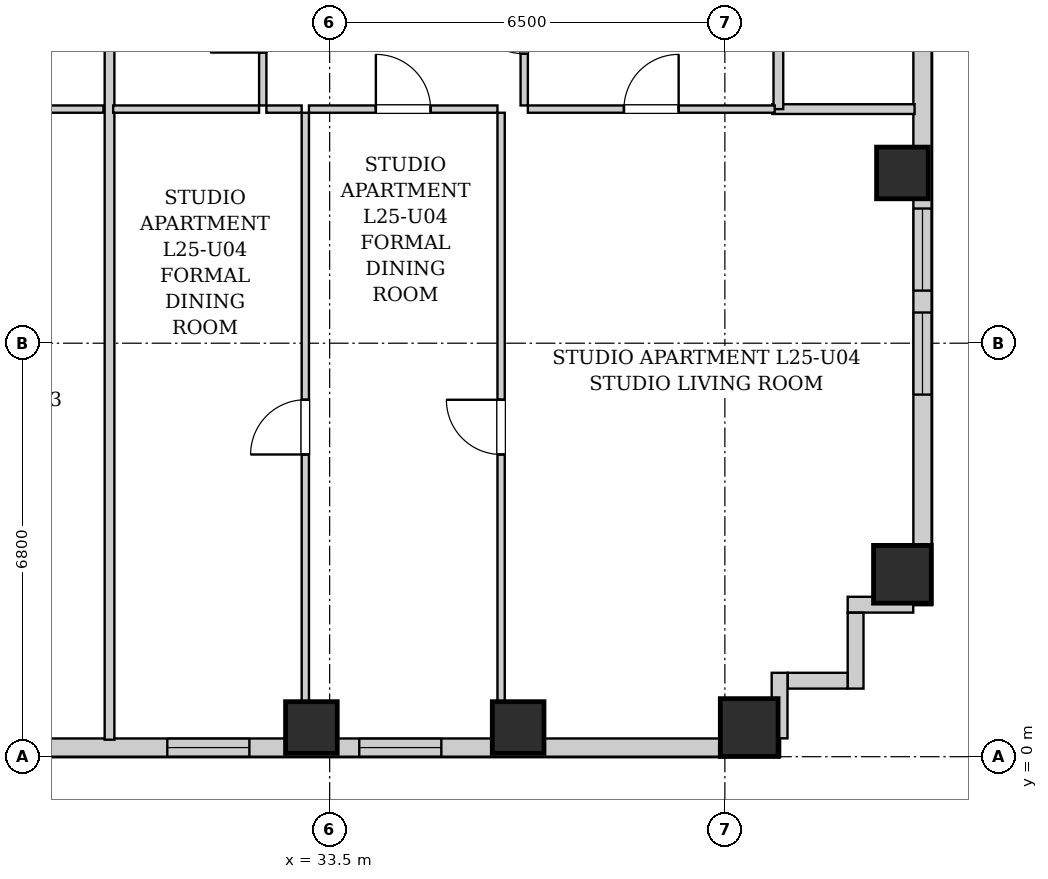
"""IFC4 building model, lengths in metres.
Left out: names, types, materials, properties, quantities, classifications, styles, units other than length and angle.
Written with IfcOpenShell. Run it as: python <this file> out.ifc"""

import sys

from ifc_helpers import new_model, si_unit, direction, frame, frame_2d, origin, origin_2d, place, context, subcontext, project, spatial, rectangle, extrude, element, fill, save


model = new_model("IFC4")
c1 = context("Model", 3, precision=1e-05, world=origin(), true_north=direction((0.0, 1.0)))
c2 = subcontext(c1, "Body", "Model", "MODEL_VIEW")
j1 = project(units=[si_unit("LENGTHUNIT", "METRE"), si_unit("PLANEANGLEUNIT", "RADIAN")], contexts=[c1])
p1 = place(None, origin())
s1 = spatial("IfcSite", under=j1, at=p1, CompositionType="ELEMENT")
p2 = place(p1, origin())
s2 = spatial("IfcBuilding", under=s1, at=p2, CompositionType="ELEMENT")
p3 = place(p2, frame((0.0, 0.0, 91.1)))
s3 = spatial("IfcBuildingStorey", under=s2, at=p3, CompositionType="ELEMENT", Elevation=91.1)
for number, where, z_axis, x_axis in (
    (1, (33.2, 0.48, 0.0), (0.0, 0.0, 1.0), (1.0, 0.0, 0.0)),
    (2, (36.6, 0.48, 0.0), (0.0, 0.0, 1.0), (1.0, 0.0, 0.0)),
):
    element("IfcColumn", number, at=place(p3, frame(where, z_axis=z_axis, x_axis=x_axis)), inside=s3, PredefinedType="COLUMN", context=c2, shape_type="SweptSolid", body=[
        extrude(rectangle(XDim=0.85, YDim=0.85, at=origin_2d()), origin(), (0.0, 0.0, 1.0), 3.2),
    ])
for number, where, z_axis, x_axis in (
    (3, (40.4, 0.48, 0.0), (0.0, 0.0, 1.0), (1.0, 0.0, 0.0)),
    (4, (42.92, 3.0, 0.0), (0.0, 0.0, 1.0), (1.0, 0.0, 0.0)),
):
    element("IfcColumn", number, at=place(p3, frame(where, z_axis=z_axis, x_axis=x_axis)), inside=s3, PredefinedType="COLUMN", context=c2, shape_type="SweptSolid", body=[
        extrude(rectangle(XDim=0.95, YDim=0.95, at=origin_2d()), origin(), (0.0, 0.0, 1.0), 3.2),
    ])
p4 = place(p3, frame((42.92, 9.6, 0.0), z_axis=(0.0, 0.0, 1.0), x_axis=(1.0, 0.0, 0.0)))
e5 = element("IfcColumn", 5, at=p4, inside=s3, PredefinedType="COLUMN", context=c2, shape_type="SweptSolid", body=[
    extrude(rectangle(XDim=0.85, YDim=0.85, at=origin_2d()), origin(), (0.0, 0.0, 1.0), 3.2),
])
p5 = place(p3, frame((43.25, 40.8, 0.0), z_axis=(0.0, 0.0, 1.0), x_axis=(0.0, -1.0, 0.0)))
e6 = element("IfcWall", 6, at=p5, inside=s3, PredefinedType="SOLIDWALL", context=c2, shape_type="SweptSolid", body=[
    extrude(rectangle(XDim=38.3, YDim=0.3, at=frame_2d((19.15, 0.0))), origin(), (0.0, 0.0, 1.0), 2.94),
])
p6 = place(p5, frame((33.495, 0.0, 0.55)))
e7 = element("IfcOpeningElement", 7, at=p6, cuts=e6, PredefinedType="OPENING", context=c2, shape_type="SweptSolid", body=[
    extrude(rectangle(XDim=1.35, YDim=1.2, at=frame_2d((0.675, 0.6))), frame((0.0, 0.16, 0.0), z_axis=(0.0, -1.0, 0.0), x_axis=(1.0, 0.0, 0.0)), (0.0, 0.0, 1.0), 0.32),
])
p7 = place(p5, frame((31.785, 0.0, 0.55)))
e8 = element("IfcOpeningElement", 8, at=p7, cuts=e6, PredefinedType="OPENING", context=c2, shape_type="SweptSolid", body=[
    extrude(rectangle(XDim=1.35, YDim=1.2, at=frame_2d((0.675, 0.6))), frame((0.0, 0.16, 0.0), z_axis=(0.0, -1.0, 0.0), x_axis=(1.0, 0.0, 0.0)), (0.0, 0.0, 1.0), 0.32),
])
p8 = place(p5, frame((3.08, 0.0, 0.55)))
e9 = element("IfcOpeningElement", 9, at=p8, cuts=e6, PredefinedType="OPENING", context=c2, shape_type="SweptSolid", body=[
    extrude(rectangle(XDim=1.35, YDim=1.2, at=frame_2d((0.675, 0.6))), frame((0.0, 0.16, 0.0), z_axis=(0.0, -1.0, 0.0), x_axis=(1.0, 0.0, 0.0)), (0.0, 0.0, 1.0), 0.32),
])
p9 = place(p5, frame((1.135, 0.0, 0.55)))
e10 = element("IfcOpeningElement", 10, at=p9, cuts=e6, PredefinedType="OPENING", context=c2, shape_type="SweptSolid", body=[
    extrude(rectangle(XDim=1.35, YDim=1.2, at=frame_2d((0.675, 0.6))), frame((0.0, 0.16, 0.0), z_axis=(0.0, -1.0, 0.0), x_axis=(1.0, 0.0, 0.0)), (0.0, 0.0, 1.0), 0.32),
])
p10 = place(p5, frame((21.93, 0.0, 0.55)))
e11 = element("IfcOpeningElement", 11, at=p10, cuts=e6, PredefinedType="OPENING", context=c2, shape_type="SweptSolid", body=[
    extrude(rectangle(XDim=1.35, YDim=1.2, at=frame_2d((0.675, 0.6))), frame((0.0, 0.16, 0.0), z_axis=(0.0, -1.0, 0.0), x_axis=(1.0, 0.0, 0.0)), (0.0, 0.0, 1.0), 0.32),
])
p11 = place(p5, frame((23.54, 0.0, 0.55)))
e12 = element("IfcOpeningElement", 12, at=p11, cuts=e6, PredefinedType="OPENING", context=c2, shape_type="SweptSolid", body=[
    extrude(rectangle(XDim=1.35, YDim=1.2, at=frame_2d((0.675, 0.6))), frame((0.0, 0.16, 0.0), z_axis=(0.0, -1.0, 0.0), x_axis=(1.0, 0.0, 0.0)), (0.0, 0.0, 1.0), 0.32),
])
p12 = place(p5, frame((14.95, 0.0, 0.55)))
e13 = element("IfcOpeningElement", 13, at=p12, cuts=e6, PredefinedType="OPENING", context=c2, shape_type="SweptSolid", body=[
    extrude(rectangle(XDim=1.35, YDim=1.2, at=frame_2d((0.675, 0.6))), frame((0.0, 0.16, 0.0), z_axis=(0.0, -1.0, 0.0), x_axis=(1.0, 0.0, 0.0)), (0.0, 0.0, 1.0), 0.32),
])
p13 = place(p5, frame((12.385, 0.0, 0.55)))
e14 = element("IfcOpeningElement", 14, at=p13, cuts=e6, PredefinedType="OPENING", context=c2, shape_type="SweptSolid", body=[
    extrude(rectangle(XDim=1.35, YDim=1.2, at=frame_2d((0.675, 0.6))), frame((0.0, 0.16, 0.0), z_axis=(0.0, -1.0, 0.0), x_axis=(1.0, 0.0, 0.0)), (0.0, 0.0, 1.0), 0.32),
])
p14 = place(p3, frame((40.9, 0.15, 0.0), z_axis=(0.0, 0.0, 1.0), x_axis=(-1.0, 0.0, 0.0)))
e15 = element("IfcWall", 15, at=p14, inside=s3, PredefinedType="SOLIDWALL", context=c2, shape_type="SweptSolid", body=[
    extrude(rectangle(XDim=23.9, YDim=0.3, at=frame_2d((11.95, 0.0))), origin(), (0.0, 0.0, 1.0), 2.94),
])
p15 = place(p14, frame((21.045, 0.0, 0.55)))
e16 = element("IfcOpeningElement", 16, at=p15, cuts=e15, PredefinedType="OPENING", context=c2, shape_type="SweptSolid", body=[
    extrude(rectangle(XDim=1.35, YDim=1.2, at=frame_2d((0.675, 0.6))), frame((0.0, 0.16, 0.0), z_axis=(0.0, -1.0, 0.0), x_axis=(1.0, 0.0, 0.0)), (0.0, 0.0, 1.0), 0.32),
])
p16 = place(p14, frame((18.4, 0.0, 0.55)))
e17 = element("IfcOpeningElement", 17, at=p16, cuts=e15, PredefinedType="OPENING", context=c2, shape_type="SweptSolid", body=[
    extrude(rectangle(XDim=1.35, YDim=1.2, at=frame_2d((0.675, 0.6))), frame((0.0, 0.16, 0.0), z_axis=(0.0, -1.0, 0.0), x_axis=(1.0, 0.0, 0.0)), (0.0, 0.0, 1.0), 0.32),
])
p17 = place(p14, frame((12.05, 0.0, 0.55)))
e18 = element("IfcOpeningElement", 18, at=p17, cuts=e15, PredefinedType="OPENING", context=c2, shape_type="SweptSolid", body=[
    extrude(rectangle(XDim=1.35, YDim=1.2, at=frame_2d((0.675, 0.6))), frame((0.0, 0.16, 0.0), z_axis=(0.0, -1.0, 0.0), x_axis=(1.0, 0.0, 0.0)), (0.0, 0.0, 1.0), 0.32),
])
p18 = place(p14, frame((8.72, 0.0, 0.55)))
e19 = element("IfcOpeningElement", 19, at=p18, cuts=e15, PredefinedType="OPENING", context=c2, shape_type="SweptSolid", body=[
    extrude(rectangle(XDim=1.35, YDim=1.2, at=frame_2d((0.675, 0.6))), frame((0.0, 0.16, 0.0), z_axis=(0.0, -1.0, 0.0), x_axis=(1.0, 0.0, 0.0)), (0.0, 0.0, 1.0), 0.32),
])
p19 = place(p14, frame((5.563, 0.0, 0.55)))
e20 = element("IfcOpeningElement", 20, at=p19, cuts=e15, PredefinedType="OPENING", context=c2, shape_type="SweptSolid", body=[
    extrude(rectangle(XDim=1.35, YDim=1.2, at=frame_2d((0.675, 0.6))), frame((0.0, 0.16, 0.0), z_axis=(0.0, -1.0, 0.0), x_axis=(1.0, 0.0, 0.0)), (0.0, 0.0, 1.0), 0.32),
])
p20 = place(p3, frame((43.098, 2.5, 0.0), z_axis=(0.0, 0.0, 1.0), x_axis=(-1.0, 0.0, 0.0)))
e21 = element("IfcWall", 21, at=p20, inside=s3, PredefinedType="SOLIDWALL", context=c2, shape_type="SweptSolid", body=[
    extrude(rectangle(XDim=1.078, YDim=0.26, at=frame_2d((0.539, 0.0))), origin(), (0.0, 0.0, 1.0), 2.94),
])
p21 = place(p3, frame((42.15, 2.368, 0.0), z_axis=(0.0, 0.0, 1.0), x_axis=(0.0, -1.0, 0.0)))
e22 = element("IfcWall", 22, at=p21, inside=s3, PredefinedType="SOLIDWALL", context=c2, shape_type="SweptSolid", body=[
    extrude(rectangle(XDim=1.248, YDim=0.26, at=frame_2d((0.624, 0.0))), origin(), (0.0, 0.0, 1.0), 2.94),
])
p22 = place(p3, frame((42.018, 1.25, 0.0), z_axis=(0.0, 0.0, 1.0), x_axis=(-1.0, 0.0, 0.0)))
e23 = element("IfcWall", 23, at=p22, inside=s3, PredefinedType="SOLIDWALL", context=c2, shape_type="SweptSolid", body=[
    extrude(rectangle(XDim=0.986, YDim=0.26, at=frame_2d((0.493, 0.0))), origin(), (0.0, 0.0, 1.0), 2.94),
])
p23 = place(p3, frame((40.9, 1.38, 0.0), z_axis=(0.0, 0.0, 1.0), x_axis=(0.0, -1.0, 0.0)))
e24 = element("IfcWall", 24, at=p23, inside=s3, PredefinedType="SOLIDWALL", context=c2, shape_type="SweptSolid", body=[
    extrude(rectangle(XDim=1.078, YDim=0.26, at=frame_2d((0.539, 0.0))), origin(), (0.0, 0.0, 1.0), 2.94),
])
p24 = place(p3, frame((25.382, 10.65, 0.0), z_axis=(0.0, 0.0, 1.0), x_axis=(1.0, 0.0, 0.0)))
e25 = element("IfcWall", 25, at=p24, inside=s3, PredefinedType="PARTITIONING", context=c2, shape_type="SweptSolid", body=[
    extrude(rectangle(XDim=4.398, YDim=0.12, at=frame_2d((2.199, 0.0))), origin(), (0.0, 0.0, 1.0), 2.94),
])
p25 = place(p24, frame((1.749, 0.0, 0.0)))
e26 = element("IfcOpeningElement", 26, at=p25, cuts=e25, PredefinedType="OPENING", context=c2, shape_type="SweptSolid", body=[
    extrude(rectangle(XDim=0.9, YDim=2.05, at=frame_2d((0.45, 1.025))), frame((0.0, 0.07, 0.0), z_axis=(0.0, -1.0, 0.0), x_axis=(1.0, 0.0, 0.0)), (0.0, 0.0, 1.0), 0.14),
])
p26 = place(p3, frame((40.78, 10.65, 0.0), z_axis=(0.0, 0.0, 1.0), x_axis=(1.0, 0.0, 0.0)))
e27 = element("IfcWall", 27, at=p26, inside=s3, PredefinedType="PARTITIONING", context=c2, shape_type="SweptSolid", body=[
    extrude(rectangle(XDim=2.34, YDim=0.16, at=frame_2d((1.17, 0.0))), origin(), (0.0, 0.0, 1.0), 2.94),
])
p27 = place(p3, frame((40.88, 10.65, 0.0), z_axis=(0.0, 0.0, 1.0), x_axis=(0.0, 1.0, 0.0)))
e28 = element("IfcWall", 28, at=p27, inside=s3, PredefinedType="PARTITIONING", context=c2, shape_type="SweptSolid", body=[
    extrude(rectangle(XDim=2.66, YDim=0.16, at=frame_2d((1.33, 0.0))), origin(), (0.0, 0.0, 1.0), 2.94),
])
p28 = place(p3, frame((29.88, 0.28, 0.0), z_axis=(0.0, 0.0, 1.0), x_axis=(0.0, 1.0, 0.0)))
e29 = element("IfcWall", 29, at=p28, inside=s3, PredefinedType="PARTITIONING", context=c2, shape_type="SweptSolid", body=[
    extrude(rectangle(XDim=13.03, YDim=0.16, at=frame_2d((6.515, 0.0))), origin(), (0.0, 0.0, 1.0), 2.94),
])
p29 = place(p3, frame((32.4, 10.71, 0.0), z_axis=(0.0, 0.0, 1.0), x_axis=(0.0, 1.0, 0.0)))
e30 = element("IfcWall", 30, at=p29, inside=s3, PredefinedType="PARTITIONING", context=c2, shape_type="SweptSolid", body=[
    extrude(rectangle(XDim=2.6, YDim=0.12, at=frame_2d((1.3, 0.0))), origin(), (0.0, 0.0, 1.0), 2.94),
])
p30 = place(p29, frame((0.87, 0.0, 0.0)))
e31 = element("IfcOpeningElement", 31, at=p30, cuts=e30, PredefinedType="OPENING", context=c2, shape_type="SweptSolid", body=[
    extrude(rectangle(XDim=0.86, YDim=2.05, at=frame_2d((0.43, 1.025))), frame((0.0, 0.07, 0.0), z_axis=(0.0, -1.0, 0.0), x_axis=(1.0, 0.0, 0.0)), (0.0, 0.0, 1.0), 0.14),
])
p31 = place(p3, frame((29.94, 10.65, 0.0), z_axis=(0.0, 0.0, 1.0), x_axis=(1.0, 0.0, 0.0)))
e32 = element("IfcWall", 32, at=p31, inside=s3, PredefinedType="PARTITIONING", context=c2, shape_type="SweptSolid", body=[
    extrude(rectangle(XDim=2.4, YDim=0.12, at=frame_2d((1.2, 0.0))), origin(), (0.0, 0.0, 1.0), 2.94),
])
p32 = place(p3, frame((36.7, 10.71, 0.0), z_axis=(0.0, 0.0, 1.0), x_axis=(0.0, 1.0, 0.0)))
e33 = element("IfcWall", 33, at=p32, inside=s3, PredefinedType="PARTITIONING", context=c2, shape_type="SweptSolid", body=[
    extrude(rectangle(XDim=2.6, YDim=0.12, at=frame_2d((1.3, 0.0))), origin(), (0.0, 0.0, 1.0), 2.94),
])
p33 = place(p32, frame((0.85, 0.0, 0.0)))
e34 = element("IfcOpeningElement", 34, at=p33, cuts=e33, PredefinedType="OPENING", context=c2, shape_type="SweptSolid", body=[
    extrude(rectangle(XDim=0.9, YDim=2.05, at=frame_2d((0.45, 1.025))), frame((0.0, 0.07, 0.0), z_axis=(0.0, -1.0, 0.0), x_axis=(1.0, 0.0, 0.0)), (0.0, 0.0, 1.0), 0.14),
])
p34 = place(p3, frame((32.46, 10.65, 0.0), z_axis=(0.0, 0.0, 1.0), x_axis=(1.0, 0.0, 0.0)))
e35 = element("IfcWall", 35, at=p34, inside=s3, PredefinedType="PARTITIONING", context=c2, shape_type="SweptSolid", body=[
    extrude(rectangle(XDim=0.58, YDim=0.12, at=frame_2d((0.29, 0.0))), origin(), (0.0, 0.0, 1.0), 2.94),
])
p35 = place(p3, frame((33.16, 10.65, 0.0), z_axis=(0.0, 0.0, 1.0), x_axis=(1.0, 0.0, 0.0)))
e36 = element("IfcWall", 36, at=p35, inside=s3, PredefinedType="PARTITIONING", context=c2, shape_type="SweptSolid", body=[
    extrude(rectangle(XDim=3.1, YDim=0.12, at=frame_2d((1.55, 0.0))), origin(), (0.0, 0.0, 1.0), 2.94),
])
p36 = place(p35, frame((1.1, 0.0, 0.0)))
e37 = element("IfcOpeningElement", 37, at=p36, cuts=e36, PredefinedType="OPENING", context=c2, shape_type="SweptSolid", body=[
    extrude(rectangle(XDim=0.9, YDim=2.05, at=frame_2d((0.45, 1.025))), frame((0.0, 0.07, 0.0), z_axis=(0.0, -1.0, 0.0), x_axis=(1.0, 0.0, 0.0)), (0.0, 0.0, 1.0), 0.14),
])
p37 = place(p3, frame((36.76, 10.65, 0.0), z_axis=(0.0, 0.0, 1.0), x_axis=(1.0, 0.0, 0.0)))
e38 = element("IfcWall", 38, at=p37, inside=s3, PredefinedType="PARTITIONING", context=c2, shape_type="SweptSolid", body=[
    extrude(rectangle(XDim=4.06, YDim=0.12, at=frame_2d((2.03, 0.0))), origin(), (0.0, 0.0, 1.0), 2.94),
])
p38 = place(p37, frame((1.58, 0.0, 0.0)))
e39 = element("IfcOpeningElement", 39, at=p38, cuts=e38, PredefinedType="OPENING", context=c2, shape_type="SweptSolid", body=[
    extrude(rectangle(XDim=0.9, YDim=2.05, at=frame_2d((0.45, 1.025))), frame((0.0, 0.07, 0.0), z_axis=(0.0, -1.0, 0.0), x_axis=(1.0, 0.0, 0.0)), (0.0, 0.0, 1.0), 0.14),
])
p39 = place(p3, frame((33.1, 0.28, 0.0), z_axis=(0.0, 0.0, 1.0), x_axis=(0.0, 1.0, 0.0)))
e40 = element("IfcWall", 40, at=p39, inside=s3, PredefinedType="PARTITIONING", context=c2, shape_type="SweptSolid", body=[
    extrude(rectangle(XDim=10.31, YDim=0.12, at=frame_2d((5.155, 0.0))), origin(), (0.0, 0.0, 1.0), 2.309),
])
p40 = place(p39, frame((4.69, 0.0, 0.0)))
e41 = element("IfcOpeningElement", 41, at=p40, cuts=e40, PredefinedType="OPENING", context=c2, shape_type="SweptSolid", body=[
    extrude(rectangle(XDim=0.9, YDim=2.05, at=frame_2d((0.45, 1.025))), frame((0.0, 0.07, 0.0), z_axis=(0.0, -1.0, 0.0), x_axis=(1.0, 0.0, 0.0)), (0.0, 0.0, 1.0), 0.14),
])
p41 = place(p3, frame((36.32, 0.28, 0.0), z_axis=(0.0, 0.0, 1.0), x_axis=(0.0, 1.0, 0.0)))
e42 = element("IfcWall", 42, at=p41, inside=s3, PredefinedType="PARTITIONING", context=c2, shape_type="SweptSolid", body=[
    extrude(rectangle(XDim=10.31, YDim=0.12, at=frame_2d((5.155, 0.0))), origin(), (0.0, 0.0, 1.0), 2.94),
])
p42 = place(p41, frame((4.69, 0.0, 0.0)))
e43 = element("IfcOpeningElement", 43, at=p42, cuts=e42, PredefinedType="OPENING", context=c2, shape_type="SweptSolid", body=[
    extrude(rectangle(XDim=0.9, YDim=2.05, at=frame_2d((0.45, 1.025))), frame((0.0, 0.07, 0.0), z_axis=(0.0, -1.0, 0.0), x_axis=(1.0, 0.0, 0.0)), (0.0, 0.0, 1.0), 0.14),
])
p43 = place(p30, origin())
e44 = element("IfcDoor", 44, at=p43, inside=s3, OperationType="SINGLE_SWING_LEFT", PredefinedType="DOOR", context=c2, shape_type="SweptSolid", body=[
    extrude(rectangle(XDim=0.86, YDim=2.05, at=frame_2d((0.43, 1.025))), frame((0.0, 0.025, 0.0), z_axis=(0.0, -1.0, 0.0), x_axis=(1.0, 0.0, 0.0)), (0.0, 0.0, 1.0), 0.05),
])
fill(e31, e44)
p44 = place(p33, origin())
e45 = element("IfcDoor", 45, at=p44, inside=s3, OperationType="SINGLE_SWING_RIGHT", PredefinedType="DOOR", context=c2, shape_type="SweptSolid", body=[
    extrude(rectangle(XDim=0.9, YDim=2.05, at=frame_2d((0.45, 1.025))), frame((0.0, 0.025, 0.0), z_axis=(0.0, -1.0, 0.0), x_axis=(1.0, 0.0, 0.0)), (0.0, 0.0, 1.0), 0.05),
])
fill(e34, e45)
p45 = place(p36, origin())
e46 = element("IfcDoor", 46, at=p45, inside=s3, OperationType="SINGLE_SWING_LEFT", PredefinedType="DOOR", context=c2, shape_type="SweptSolid", body=[
    extrude(rectangle(XDim=0.9, YDim=2.05, at=frame_2d((0.45, 1.025))), frame((0.0, 0.025, 0.0), z_axis=(0.0, -1.0, 0.0), x_axis=(1.0, 0.0, 0.0)), (0.0, 0.0, 1.0), 0.05),
])
fill(e37, e46)
p46 = place(p38, origin())
e47 = element("IfcDoor", 47, at=p46, inside=s3, OperationType="SINGLE_SWING_RIGHT", PredefinedType="DOOR", context=c2, shape_type="SweptSolid", body=[
    extrude(rectangle(XDim=0.9, YDim=2.05, at=frame_2d((0.45, 1.025))), frame((0.0, 0.025, 0.0), z_axis=(0.0, -1.0, 0.0), x_axis=(1.0, 0.0, 0.0)), (0.0, 0.0, 1.0), 0.05),
])
fill(e39, e47)
p47 = place(p40, origin())
e48 = element("IfcDoor", 48, at=p47, inside=s3, OperationType="SINGLE_SWING_LEFT", PredefinedType="DOOR", context=c2, shape_type="SweptSolid", body=[
    extrude(rectangle(XDim=0.9, YDim=2.05, at=frame_2d((0.45, 1.025))), frame((0.0, 0.025, 0.0), z_axis=(0.0, -1.0, 0.0), x_axis=(1.0, 0.0, 0.0)), (0.0, 0.0, 1.0), 0.05),
])
fill(e41, e48)
p48 = place(p42, origin())
e49 = element("IfcDoor", 49, at=p48, inside=s3, OperationType="SINGLE_SWING_RIGHT", PredefinedType="DOOR", context=c2, shape_type="SweptSolid", body=[
    extrude(rectangle(XDim=0.9, YDim=2.05, at=frame_2d((0.45, 1.025))), frame((0.0, 0.025, 0.0), z_axis=(0.0, -1.0, 0.0), x_axis=(1.0, 0.0, 0.0)), (0.0, 0.0, 1.0), 0.05),
])
fill(e43, e49)
p49 = place(p18, origin())
e50 = element("IfcWindow", 50, at=p49, inside=s3, PartitioningType="SINGLE_PANEL", PredefinedType="WINDOW", context=c2, shape_type="SweptSolid", body=[
    extrude(rectangle(XDim=1.35, YDim=1.2, at=frame_2d((0.675, 0.6))), frame((0.0, 0.03, 0.0), z_axis=(0.0, -1.0, 0.0), x_axis=(1.0, 0.0, 0.0)), (0.0, 0.0, 1.0), 0.06),
])
fill(e19, e50)
p50 = place(p19, origin())
e51 = element("IfcWindow", 51, at=p50, inside=s3, PartitioningType="SINGLE_PANEL", PredefinedType="WINDOW", context=c2, shape_type="SweptSolid", body=[
    extrude(rectangle(XDim=1.35, YDim=1.2, at=frame_2d((0.675, 0.6))), frame((0.0, 0.03, 0.0), z_axis=(0.0, -1.0, 0.0), x_axis=(1.0, 0.0, 0.0)), (0.0, 0.0, 1.0), 0.06),
])
fill(e20, e51)
p51 = place(p6, origin())
e52 = element("IfcWindow", 52, at=p51, inside=s3, PartitioningType="SINGLE_PANEL", PredefinedType="WINDOW", context=c2, shape_type="SweptSolid", body=[
    extrude(rectangle(XDim=1.35, YDim=1.2, at=frame_2d((0.675, 0.6))), frame((0.0, 0.03, 0.0), z_axis=(0.0, -1.0, 0.0), x_axis=(1.0, 0.0, 0.0)), (0.0, 0.0, 1.0), 0.06),
])
fill(e7, e52)
p52 = place(p7, origin())
e53 = element("IfcWindow", 53, at=p52, inside=s3, PartitioningType="SINGLE_PANEL", PredefinedType="WINDOW", context=c2, shape_type="SweptSolid", body=[
    extrude(rectangle(XDim=1.35, YDim=1.2, at=frame_2d((0.675, 0.6))), frame((0.0, 0.03, 0.0), z_axis=(0.0, -1.0, 0.0), x_axis=(1.0, 0.0, 0.0)), (0.0, 0.0, 1.0), 0.06),
])
fill(e8, e53)
save(model, sys.argv[1])
